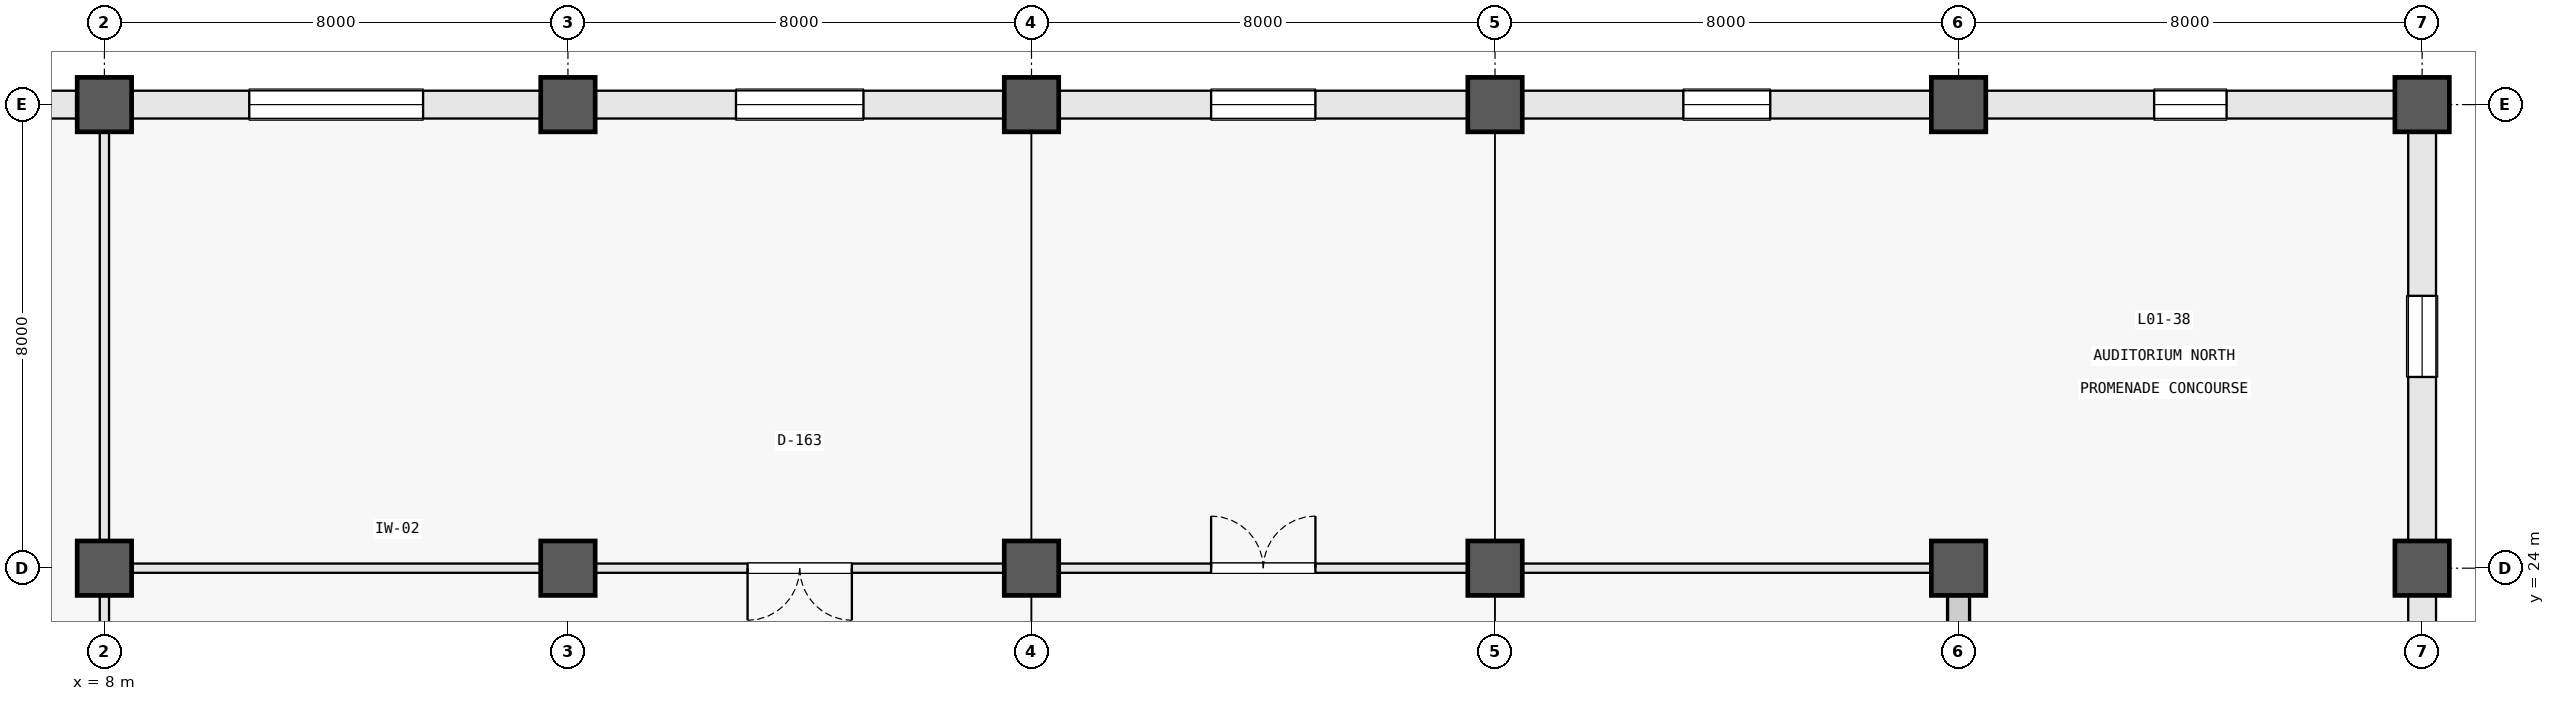
"""IFC4 building model, lengths in metres.
Left out: names, types, materials, properties, quantities, classifications, styles, units other than length and angle.
Written with IfcOpenShell. Run it as: python <this file> out.ifc"""

import sys

from ifc_helpers import new_model, si_unit, direction, frame, frame_2d, origin, origin_2d, place, context, subcontext, project, spatial, rectangle, circle, extrude, element, fill, save


model = new_model("IFC4")
c1 = context("Model", 3, precision=1e-05, world=origin(), true_north=direction((0.0, 1.0)))
c2 = subcontext(c1, "Body", "Model", "MODEL_VIEW")
j1 = project(units=[si_unit("LENGTHUNIT", "METRE"), si_unit("PLANEANGLEUNIT", "RADIAN")], contexts=[c1])
p1 = place(None, origin())
s1 = spatial("IfcSite", under=j1, at=p1, CompositionType="ELEMENT")
p2 = place(p1, origin())
s2 = spatial("IfcBuilding", under=s1, at=p2, CompositionType="ELEMENT")
p3 = place(p2, origin())
s3 = spatial("IfcBuildingStorey", under=s2, at=p3, CompositionType="ELEMENT", Elevation=0.0)
for number, where, z_axis, x_axis in (
    (1, (8.0, 24.0, 0.0), (0.0, 0.0, 1.0), (1.0, 0.0, 0.0)),
    (2, (8.0, 32.0, 0.0), (0.0, 0.0, 1.0), (1.0, 0.0, 0.0)),
    (3, (16.0, 24.0, 0.0), (0.0, 0.0, 1.0), (1.0, 0.0, 0.0)),
    (4, (16.0, 32.0, 0.0), (0.0, 0.0, 1.0), (1.0, 0.0, 0.0)),
    (5, (24.0, 24.0, 0.0), (0.0, 0.0, 1.0), (1.0, 0.0, 0.0)),
    (6, (24.0, 32.0, 0.0), (0.0, 0.0, 1.0), (1.0, 0.0, 0.0)),
    (7, (32.0, 24.0, 0.0), (0.0, 0.0, 1.0), (1.0, 0.0, 0.0)),
    (8, (32.0, 32.0, 0.0), (0.0, 0.0, 1.0), (1.0, 0.0, 0.0)),
    (9, (40.0, 24.0, 0.0), (0.0, 0.0, 1.0), (1.0, 0.0, 0.0)),
    (10, (40.0, 32.0, 0.0), (0.0, 0.0, 1.0), (1.0, 0.0, 0.0)),
    (11, (48.0, 24.0, 0.0), (0.0, 0.0, 1.0), (1.0, 0.0, 0.0)),
    (12, (48.0, 32.0, 0.0), (0.0, 0.0, 1.0), (1.0, 0.0, 0.0)),
):
    element("IfcColumn", number, at=place(p3, frame(where, z_axis=z_axis, x_axis=x_axis)), inside=s3, PredefinedType="COLUMN", context=c2, shape_type="SweptSolid", body=[
        extrude(circle(Radius=0.47, at=origin_2d()), origin(), (0.0, 0.0, 1.0), 5.4),
    ])
p4 = place(p3, frame((40.0, 16.47, 0.0), z_axis=(0.0, 0.0, 1.0), x_axis=(0.0, 1.0, 0.0)))
e13 = element("IfcWall", 13, at=p4, inside=s3, PredefinedType="SHEAR", context=c2, shape_type="SweptSolid", body=[
    extrude(rectangle(XDim=7.06, YDim=0.38, at=frame_2d((3.53, 0.0))), origin(), (0.0, 0.0, 1.0), 5.03),
])
p5 = place(p3, frame((7.577, 32.0, 0.0), z_axis=(0.0, 0.0, 1.0), x_axis=(-1.0, 0.0, 0.0)))
e14 = element("IfcWall", 14, at=p5, inside=s3, PredefinedType="STANDARD", context=c2, shape_type="SweptSolid", body=[
    extrude(rectangle(XDim=7.154, YDim=0.48, at=frame_2d((3.577, 0.0))), origin(), (0.0, 0.0, 1.0), 3.91),
])
p6 = place(p5, frame((2.977, 0.0, 0.72)))
e15 = element("IfcOpeningElement", 15, at=p6, cuts=e14, PredefinedType="OPENING", context=c2, shape_type="SweptSolid", body=[
    extrude(rectangle(XDim=1.2, YDim=1.6, at=frame_2d((0.6, 0.8))), frame((0.0, 0.252, 0.0), z_axis=(0.0, -1.0, 0.0), x_axis=(1.0, 0.0, 0.0)), (0.0, 0.0, 1.0), 0.504),
])
p7 = place(p3, frame((15.577, 32.0, 0.0), z_axis=(0.0, 0.0, 1.0), x_axis=(-1.0, 0.0, 0.0)))
e16 = element("IfcWall", 16, at=p7, inside=s3, PredefinedType="STANDARD", context=c2, shape_type="SweptSolid", body=[
    extrude(rectangle(XDim=7.154, YDim=0.48, at=frame_2d((3.577, 0.0))), origin(), (0.0, 0.0, 1.0), 3.91),
])
p8 = place(p7, frame((2.077, 0.0, 0.72)))
e17 = element("IfcOpeningElement", 17, at=p8, cuts=e16, PredefinedType="OPENING", context=c2, shape_type="SweptSolid", body=[
    extrude(rectangle(XDim=3.0, YDim=2.1, at=frame_2d((1.5, 1.05))), frame((0.0, 0.252, 0.0), z_axis=(0.0, -1.0, 0.0), x_axis=(1.0, 0.0, 0.0)), (0.0, 0.0, 1.0), 0.504),
])
p9 = place(p3, frame((23.577, 32.0, 0.0), z_axis=(0.0, 0.0, 1.0), x_axis=(-1.0, 0.0, 0.0)))
e18 = element("IfcWall", 18, at=p9, inside=s3, PredefinedType="STANDARD", context=c2, shape_type="SweptSolid", body=[
    extrude(rectangle(XDim=7.154, YDim=0.48, at=frame_2d((3.577, 0.0))), origin(), (0.0, 0.0, 1.0), 3.91),
])
p10 = place(p9, frame((2.477, 0.0, 0.72)))
e19 = element("IfcOpeningElement", 19, at=p10, cuts=e18, PredefinedType="OPENING", context=c2, shape_type="SweptSolid", body=[
    extrude(rectangle(XDim=2.2, YDim=2.5, at=frame_2d((1.1, 1.25))), frame((0.0, 0.252, 0.0), z_axis=(0.0, -1.0, 0.0), x_axis=(1.0, 0.0, 0.0)), (0.0, 0.0, 1.0), 0.504),
])
p11 = place(p3, frame((31.577, 32.0, 0.0), z_axis=(0.0, 0.0, 1.0), x_axis=(-1.0, 0.0, 0.0)))
e20 = element("IfcWall", 20, at=p11, inside=s3, PredefinedType="STANDARD", context=c2, shape_type="SweptSolid", body=[
    extrude(rectangle(XDim=7.154, YDim=0.48, at=frame_2d((3.577, 0.0))), origin(), (0.0, 0.0, 1.0), 3.91),
])
p12 = place(p11, frame((2.677, 0.0, 0.72)))
e21 = element("IfcOpeningElement", 21, at=p12, cuts=e20, PredefinedType="OPENING", context=c2, shape_type="SweptSolid", body=[
    extrude(rectangle(XDim=1.8, YDim=2.1, at=frame_2d((0.9, 1.05))), frame((0.0, 0.252, 0.0), z_axis=(0.0, -1.0, 0.0), x_axis=(1.0, 0.0, 0.0)), (0.0, 0.0, 1.0), 0.504),
])
p13 = place(p3, frame((39.577, 32.0, 0.0), z_axis=(0.0, 0.0, 1.0), x_axis=(-1.0, 0.0, 0.0)))
e22 = element("IfcWall", 22, at=p13, inside=s3, PredefinedType="STANDARD", context=c2, shape_type="SweptSolid", body=[
    extrude(rectangle(XDim=7.154, YDim=0.48, at=frame_2d((3.577, 0.0))), origin(), (0.0, 0.0, 1.0), 3.91),
])
p14 = place(p13, frame((2.827, 0.0, 0.72)))
e23 = element("IfcOpeningElement", 23, at=p14, cuts=e22, PredefinedType="OPENING", context=c2, shape_type="SweptSolid", body=[
    extrude(rectangle(XDim=1.5, YDim=1.8, at=frame_2d((0.75, 0.9))), frame((0.0, 0.252, 0.0), z_axis=(0.0, -1.0, 0.0), x_axis=(1.0, 0.0, 0.0)), (0.0, 0.0, 1.0), 0.504),
])
p15 = place(p3, frame((47.577, 32.0, 0.0), z_axis=(0.0, 0.0, 1.0), x_axis=(-1.0, 0.0, 0.0)))
e24 = element("IfcWall", 24, at=p15, inside=s3, PredefinedType="STANDARD", context=c2, shape_type="SweptSolid", body=[
    extrude(rectangle(XDim=7.154, YDim=0.48, at=frame_2d((3.577, 0.0))), origin(), (0.0, 0.0, 1.0), 3.91),
])
p16 = place(p15, frame((2.952, 0.0, 0.72)))
e25 = element("IfcOpeningElement", 25, at=p16, cuts=e24, PredefinedType="OPENING", context=c2, shape_type="SweptSolid", body=[
    extrude(rectangle(XDim=1.25, YDim=1.9, at=frame_2d((0.625, 0.95))), frame((0.0, 0.252, 0.0), z_axis=(0.0, -1.0, 0.0), x_axis=(1.0, 0.0, 0.0)), (0.0, 0.0, 1.0), 0.504),
])
p17 = place(p3, frame((48.0, 16.423, 0.0), z_axis=(0.0, 0.0, 1.0), x_axis=(0.0, 1.0, 0.0)))
e26 = element("IfcWall", 26, at=p17, inside=s3, PredefinedType="STANDARD", context=c2, shape_type="SweptSolid", body=[
    extrude(rectangle(XDim=7.154, YDim=0.48, at=frame_2d((3.577, 0.0))), origin(), (0.0, 0.0, 1.0), 3.91),
])
p18 = place(p17, frame((2.777, 0.0, 0.72)))
e27 = element("IfcOpeningElement", 27, at=p18, cuts=e26, PredefinedType="OPENING", context=c2, shape_type="SweptSolid", body=[
    extrude(rectangle(XDim=1.6, YDim=2.2, at=frame_2d((0.8, 1.1))), frame((0.0, 0.252, 0.0), z_axis=(0.0, -1.0, 0.0), x_axis=(1.0, 0.0, 0.0)), (0.0, 0.0, 1.0), 0.504),
])
p19 = place(p3, frame((48.0, 24.423, 0.0), z_axis=(0.0, 0.0, 1.0), x_axis=(0.0, 1.0, 0.0)))
e28 = element("IfcWall", 28, at=p19, inside=s3, PredefinedType="STANDARD", context=c2, shape_type="SweptSolid", body=[
    extrude(rectangle(XDim=7.154, YDim=0.48, at=frame_2d((3.577, 0.0))), origin(), (0.0, 0.0, 1.0), 3.91),
])
p20 = place(p19, frame((2.877, 0.0, 0.72)))
e29 = element("IfcOpeningElement", 29, at=p20, cuts=e28, PredefinedType="OPENING", context=c2, shape_type="SweptSolid", body=[
    extrude(rectangle(XDim=1.4, YDim=2.0, at=frame_2d((0.7, 1.0))), frame((0.0, 0.252, 0.0), z_axis=(0.0, -1.0, 0.0), x_axis=(1.0, 0.0, 0.0)), (0.0, 0.0, 1.0), 0.504),
])
p21 = place(p3, frame((8.48, 24.0, 0.0), z_axis=(0.0, 0.0, 1.0), x_axis=(1.0, 0.0, 0.0)))
e30 = element("IfcWall", 30, at=p21, inside=s3, PredefinedType="PARTITIONING", context=c2, shape_type="SweptSolid", body=[
    extrude(rectangle(XDim=7.04, YDim=0.16, at=frame_2d((3.52, 0.0))), origin(), (0.0, 0.0, 1.0), 3.88),
])
p22 = place(p3, frame((16.48, 24.0, 0.0), z_axis=(0.0, 0.0, 1.0), x_axis=(1.0, 0.0, 0.0)))
e31 = element("IfcWall", 31, at=p22, inside=s3, PredefinedType="PARTITIONING", context=c2, shape_type="SweptSolid", body=[
    extrude(rectangle(XDim=7.04, YDim=0.16, at=frame_2d((3.52, 0.0))), origin(), (0.0, 0.0, 1.0), 3.88),
])
p23 = place(p22, frame((2.62, 0.0, 0.0)))
e32 = element("IfcOpeningElement", 32, at=p23, cuts=e31, PredefinedType="OPENING", context=c2, shape_type="SweptSolid", body=[
    extrude(rectangle(XDim=1.8, YDim=2.3, at=frame_2d((0.9, 1.15))), frame((0.0, 0.092, 0.0), z_axis=(0.0, -1.0, 0.0), x_axis=(1.0, 0.0, 0.0)), (0.0, 0.0, 1.0), 0.184),
])
p24 = place(p3, frame((24.48, 24.0, 0.0), z_axis=(0.0, 0.0, 1.0), x_axis=(1.0, 0.0, 0.0)))
e33 = element("IfcWall", 33, at=p24, inside=s3, PredefinedType="PARTITIONING", context=c2, shape_type="SweptSolid", body=[
    extrude(rectangle(XDim=7.04, YDim=0.16, at=frame_2d((3.52, 0.0))), origin(), (0.0, 0.0, 1.0), 3.88),
])
p25 = place(p24, frame((2.62, 0.0, 0.0)))
e34 = element("IfcOpeningElement", 34, at=p25, cuts=e33, PredefinedType="OPENING", context=c2, shape_type="SweptSolid", body=[
    extrude(rectangle(XDim=1.8, YDim=2.3, at=frame_2d((0.9, 1.15))), frame((0.0, 0.092, 0.0), z_axis=(0.0, -1.0, 0.0), x_axis=(1.0, 0.0, 0.0)), (0.0, 0.0, 1.0), 0.184),
])
p26 = place(p3, frame((32.48, 24.0, 0.0), z_axis=(0.0, 0.0, 1.0), x_axis=(1.0, 0.0, 0.0)))
e35 = element("IfcWall", 35, at=p26, inside=s3, PredefinedType="PARTITIONING", context=c2, shape_type="SweptSolid", body=[
    extrude(rectangle(XDim=7.04, YDim=0.16, at=frame_2d((3.52, 0.0))), origin(), (0.0, 0.0, 1.0), 3.88),
])
p27 = place(p3, frame((8.0, 16.48, 0.0), z_axis=(0.0, 0.0, 1.0), x_axis=(0.0, 1.0, 0.0)))
e36 = element("IfcWall", 36, at=p27, inside=s3, PredefinedType="PARTITIONING", context=c2, shape_type="SweptSolid", body=[
    extrude(rectangle(XDim=7.04, YDim=0.16, at=frame_2d((3.52, 0.0))), origin(), (0.0, 0.0, 1.0), 3.88),
])
p28 = place(p27, frame((2.72, 0.0, 0.0)))
e37 = element("IfcOpeningElement", 37, at=p28, cuts=e36, PredefinedType="OPENING", context=c2, shape_type="SweptSolid", body=[
    extrude(rectangle(XDim=1.6, YDim=2.2, at=frame_2d((0.8, 1.1))), frame((0.0, 0.092, 0.0), z_axis=(0.0, -1.0, 0.0), x_axis=(1.0, 0.0, 0.0)), (0.0, 0.0, 1.0), 0.184),
])
p29 = place(p3, frame((8.0, 24.48, 0.0), z_axis=(0.0, 0.0, 1.0), x_axis=(0.0, 1.0, 0.0)))
e38 = element("IfcWall", 38, at=p29, inside=s3, PredefinedType="PARTITIONING", context=c2, shape_type="SweptSolid", body=[
    extrude(rectangle(XDim=7.04, YDim=0.16, at=frame_2d((3.52, 0.0))), origin(), (0.0, 0.0, 1.0), 3.88),
])
p30 = place(p8, origin())
e39 = element("IfcWindow", 39, at=p30, inside=s3, PartitioningType="SINGLE_PANEL", PredefinedType="WINDOW", context=c2, shape_type="SweptSolid", body=[
    extrude(rectangle(XDim=3.0, YDim=2.1, at=frame_2d((1.5, 1.05))), frame((0.0, 0.03, 0.0), z_axis=(0.0, -1.0, 0.0), x_axis=(1.0, 0.0, 0.0)), (0.0, 0.0, 1.0), 0.06),
])
fill(e17, e39)
p31 = place(p10, origin())
e40 = element("IfcWindow", 40, at=p31, inside=s3, PartitioningType="SINGLE_PANEL", PredefinedType="WINDOW", context=c2, shape_type="SweptSolid", body=[
    extrude(rectangle(XDim=2.2, YDim=2.5, at=frame_2d((1.1, 1.25))), frame((0.0, 0.03, 0.0), z_axis=(0.0, -1.0, 0.0), x_axis=(1.0, 0.0, 0.0)), (0.0, 0.0, 1.0), 0.06),
])
fill(e19, e40)
p32 = place(p12, origin())
e41 = element("IfcWindow", 41, at=p32, inside=s3, PartitioningType="SINGLE_PANEL", PredefinedType="WINDOW", context=c2, shape_type="SweptSolid", body=[
    extrude(rectangle(XDim=1.8, YDim=2.1, at=frame_2d((0.9, 1.05))), frame((0.0, 0.03, 0.0), z_axis=(0.0, -1.0, 0.0), x_axis=(1.0, 0.0, 0.0)), (0.0, 0.0, 1.0), 0.06),
])
fill(e21, e41)
p33 = place(p14, origin())
e42 = element("IfcWindow", 42, at=p33, inside=s3, PartitioningType="SINGLE_PANEL", PredefinedType="WINDOW", context=c2, shape_type="SweptSolid", body=[
    extrude(rectangle(XDim=1.5, YDim=1.8, at=frame_2d((0.75, 0.9))), frame((0.0, 0.03, 0.0), z_axis=(0.0, -1.0, 0.0), x_axis=(1.0, 0.0, 0.0)), (0.0, 0.0, 1.0), 0.06),
])
fill(e23, e42)
p34 = place(p16, origin())
e43 = element("IfcWindow", 43, at=p34, inside=s3, PartitioningType="SINGLE_PANEL", PredefinedType="WINDOW", context=c2, shape_type="SweptSolid", body=[
    extrude(rectangle(XDim=1.25, YDim=1.9, at=frame_2d((0.625, 0.95))), frame((0.0, 0.03, 0.0), z_axis=(0.0, -1.0, 0.0), x_axis=(1.0, 0.0, 0.0)), (0.0, 0.0, 1.0), 0.06),
])
fill(e25, e43)
p35 = place(p20, origin())
e44 = element("IfcWindow", 44, at=p35, inside=s3, PartitioningType="SINGLE_PANEL", PredefinedType="WINDOW", context=c2, shape_type="SweptSolid", body=[
    extrude(rectangle(XDim=1.4, YDim=2.0, at=frame_2d((0.7, 1.0))), frame((0.0, 0.03, 0.0), z_axis=(0.0, -1.0, 0.0), x_axis=(1.0, 0.0, 0.0)), (0.0, 0.0, 1.0), 0.06),
])
fill(e29, e44)
p36 = place(p23, frame((1.8, 0.0, 0.0), z_axis=(0.0, 0.0, 1.0), x_axis=(-1.0, 0.0, 0.0)))
e45 = element("IfcDoor", 45, at=p36, inside=s3, OperationType="DOUBLE_DOOR_SINGLE_SWING", PredefinedType="DOOR", context=c2, shape_type="SweptSolid", body=[
    extrude(rectangle(XDim=1.8, YDim=2.3, at=frame_2d((0.9, 1.15))), frame((0.0, 0.025, 0.0), z_axis=(0.0, -1.0, 0.0), x_axis=(1.0, 0.0, 0.0)), (0.0, 0.0, 1.0), 0.05),
])
fill(e32, e45)
p37 = place(p25, origin())
e46 = element("IfcDoor", 46, at=p37, inside=s3, OperationType="DOUBLE_DOOR_SINGLE_SWING", PredefinedType="DOOR", context=c2, shape_type="SweptSolid", body=[
    extrude(rectangle(XDim=1.8, YDim=2.3, at=frame_2d((0.9, 1.15))), frame((0.0, 0.025, 0.0), z_axis=(0.0, -1.0, 0.0), x_axis=(1.0, 0.0, 0.0)), (0.0, 0.0, 1.0), 0.05),
])
fill(e34, e46)
save(model, sys.argv[1])
